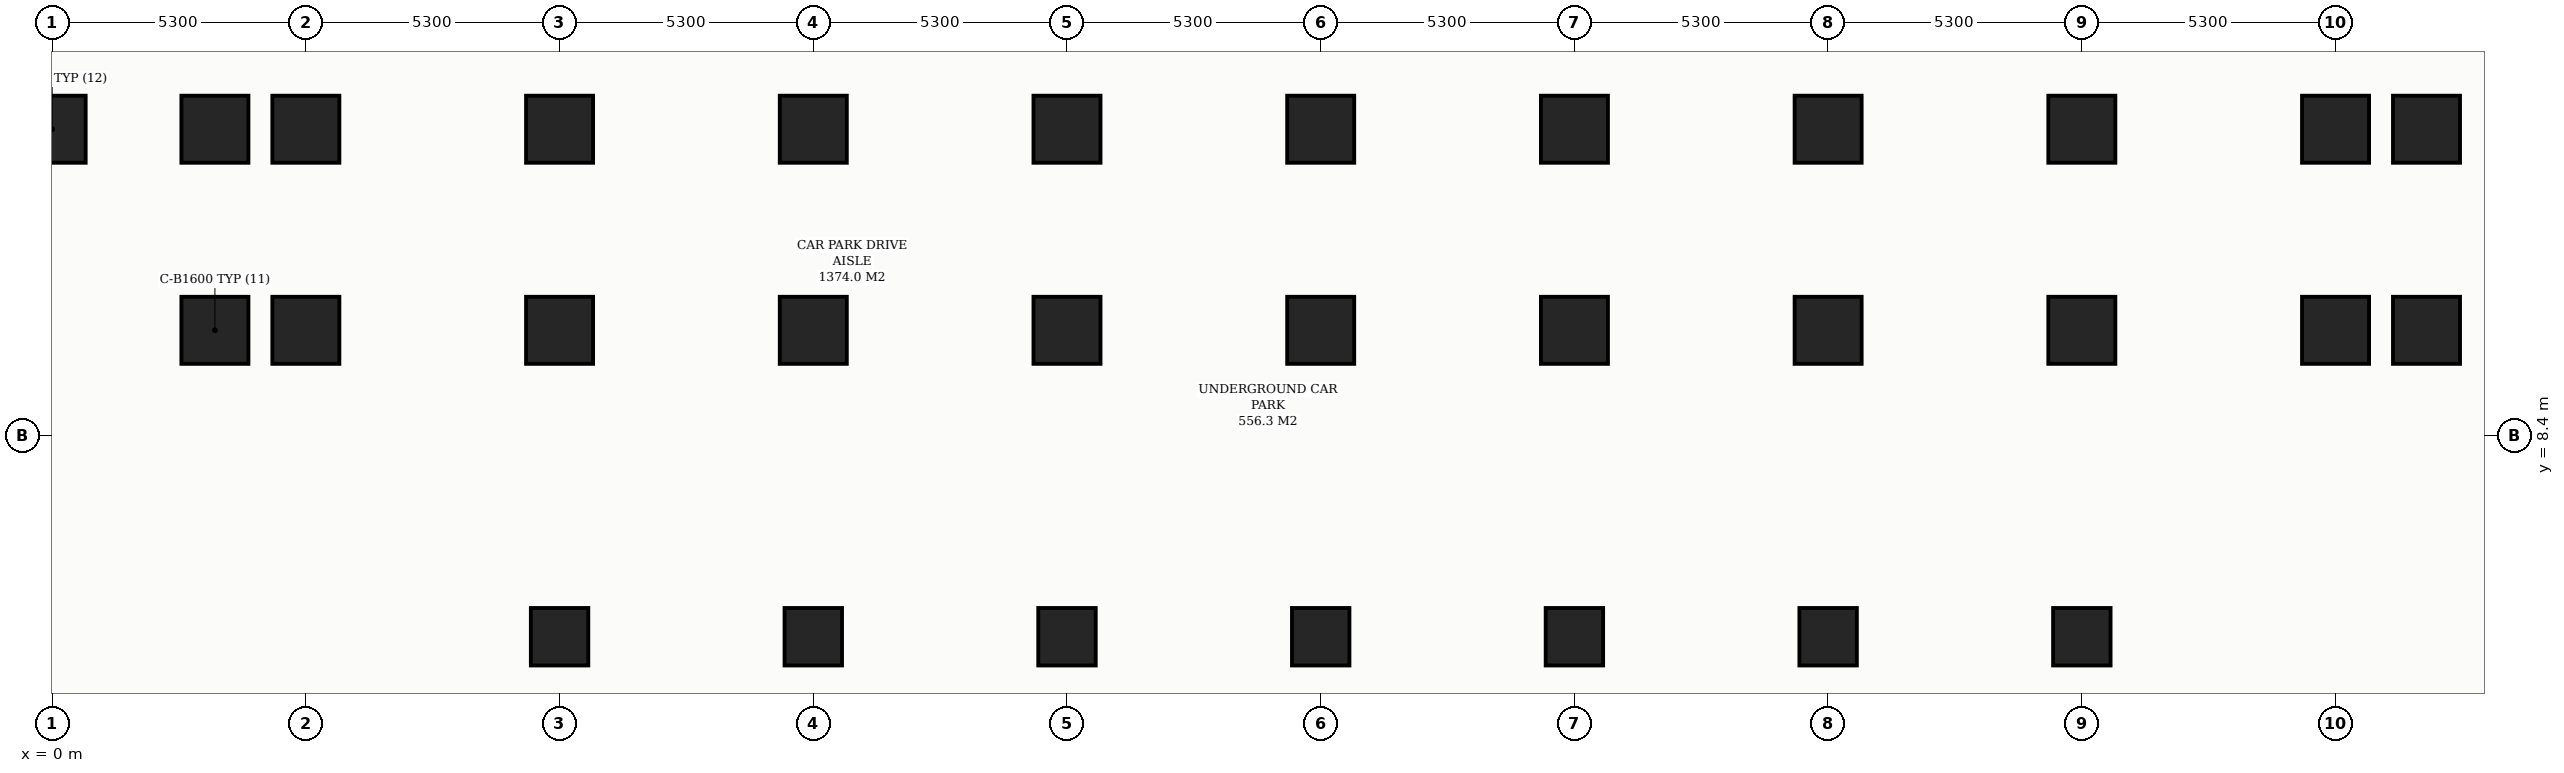
"""IFC4 building model, lengths in metres.
Left out: names, types, materials, properties, quantities, classifications, styles, units other than length and angle.
Written with IfcOpenShell. Run it as: python <this file> out.ifc"""

import sys

from ifc_helpers import new_model, si_unit, direction, frame, origin, origin_2d, place, context, subcontext, project, spatial, hollow_rectangle, extrude, element, save


model = new_model("IFC4")
c1 = context("Model", 3, precision=1e-05, world=origin(), true_north=direction((0.0, 1.0)))
c2 = subcontext(c1, "Body", "Model", "MODEL_VIEW")
j1 = project(units=[si_unit("LENGTHUNIT", "METRE"), si_unit("PLANEANGLEUNIT", "RADIAN")], contexts=[c1])
p1 = place(None, origin())
s1 = spatial("IfcSite", under=j1, at=p1, CompositionType="ELEMENT")
p2 = place(p1, origin())
s2 = spatial("IfcBuilding", under=s1, at=p2, CompositionType="ELEMENT")
p3 = place(p2, frame((0.0, 0.0, -8.4)))
s3 = spatial("IfcBuildingStorey", under=s2, at=p3, CompositionType="ELEMENT", Elevation=-8.4)
p4 = place(p3, frame((10.6, 14.8, 0.0), z_axis=(0.0, 0.0, 1.0), x_axis=(1.0, 0.0, 0.0)))
e1 = element("IfcColumn", 1, at=p4, inside=s3, PredefinedType="COLUMN", context=c2, shape_type="SweptSolid", body=[
    extrude(hollow_rectangle(XDim=1.4, YDim=1.4, WallThickness=0.045, at=origin_2d()), origin(), (0.0, 0.0, 1.0), 4.2),
])
p5 = place(p3, frame((10.6, 4.2, 0.0), z_axis=(0.0, 0.0, 1.0), x_axis=(1.0, 0.0, 0.0)))
e2 = element("IfcColumn", 2, at=p5, inside=s3, PredefinedType="COLUMN", context=c2, shape_type="SweptSolid", body=[
    extrude(hollow_rectangle(XDim=1.2, YDim=1.2, WallThickness=0.04, at=origin_2d()), origin(), (0.0, 0.0, 1.0), 4.2),
])
for number, where, z_axis, x_axis in (
    (3, (10.6, 10.6, 0.0), (0.0, 0.0, 1.0), (1.0, 0.0, 0.0)),
    (4, (15.9, 14.8, 0.0), (0.0, 0.0, 1.0), (1.0, 0.0, 0.0)),
):
    element("IfcColumn", number, at=place(p3, frame(where, z_axis=z_axis, x_axis=x_axis)), inside=s3, PredefinedType="COLUMN", context=c2, shape_type="SweptSolid", body=[
        extrude(hollow_rectangle(XDim=1.4, YDim=1.4, WallThickness=0.045, at=origin_2d()), origin(), (0.0, 0.0, 1.0), 4.2),
    ])
p6 = place(p3, frame((15.9, 4.2, 0.0), z_axis=(0.0, 0.0, 1.0), x_axis=(1.0, 0.0, 0.0)))
e5 = element("IfcColumn", 5, at=p6, inside=s3, PredefinedType="COLUMN", context=c2, shape_type="SweptSolid", body=[
    extrude(hollow_rectangle(XDim=1.2, YDim=1.2, WallThickness=0.04, at=origin_2d()), origin(), (0.0, 0.0, 1.0), 4.2),
])
for number, where, z_axis, x_axis in (
    (6, (15.9, 10.6, 0.0), (0.0, 0.0, 1.0), (1.0, 0.0, 0.0)),
    (7, (21.2, 14.8, 0.0), (0.0, 0.0, 1.0), (1.0, 0.0, 0.0)),
):
    element("IfcColumn", number, at=place(p3, frame(where, z_axis=z_axis, x_axis=x_axis)), inside=s3, PredefinedType="COLUMN", context=c2, shape_type="SweptSolid", body=[
        extrude(hollow_rectangle(XDim=1.4, YDim=1.4, WallThickness=0.045, at=origin_2d()), origin(), (0.0, 0.0, 1.0), 4.2),
    ])
p7 = place(p3, frame((21.2, 4.2, 0.0), z_axis=(0.0, 0.0, 1.0), x_axis=(1.0, 0.0, 0.0)))
e8 = element("IfcColumn", 8, at=p7, inside=s3, PredefinedType="COLUMN", context=c2, shape_type="SweptSolid", body=[
    extrude(hollow_rectangle(XDim=1.2, YDim=1.2, WallThickness=0.04, at=origin_2d()), origin(), (0.0, 0.0, 1.0), 4.2),
])
for number, where, z_axis, x_axis in (
    (9, (21.2, 10.6, 0.0), (0.0, 0.0, 1.0), (1.0, 0.0, 0.0)),
    (10, (26.5, 14.8, 0.0), (0.0, 0.0, 1.0), (1.0, 0.0, 0.0)),
):
    element("IfcColumn", number, at=place(p3, frame(where, z_axis=z_axis, x_axis=x_axis)), inside=s3, PredefinedType="COLUMN", context=c2, shape_type="SweptSolid", body=[
        extrude(hollow_rectangle(XDim=1.4, YDim=1.4, WallThickness=0.045, at=origin_2d()), origin(), (0.0, 0.0, 1.0), 4.2),
    ])
p8 = place(p3, frame((26.5, 4.2, 0.0), z_axis=(0.0, 0.0, 1.0), x_axis=(1.0, 0.0, 0.0)))
e11 = element("IfcColumn", 11, at=p8, inside=s3, PredefinedType="COLUMN", context=c2, shape_type="SweptSolid", body=[
    extrude(hollow_rectangle(XDim=1.2, YDim=1.2, WallThickness=0.04, at=origin_2d()), origin(), (0.0, 0.0, 1.0), 4.2),
])
for number, where, z_axis, x_axis in (
    (12, (26.5, 10.6, 0.0), (0.0, 0.0, 1.0), (1.0, 0.0, 0.0)),
    (13, (31.8, 14.8, 0.0), (0.0, 0.0, 1.0), (1.0, 0.0, 0.0)),
):
    element("IfcColumn", number, at=place(p3, frame(where, z_axis=z_axis, x_axis=x_axis)), inside=s3, PredefinedType="COLUMN", context=c2, shape_type="SweptSolid", body=[
        extrude(hollow_rectangle(XDim=1.4, YDim=1.4, WallThickness=0.045, at=origin_2d()), origin(), (0.0, 0.0, 1.0), 4.2),
    ])
p9 = place(p3, frame((31.8, 4.2, 0.0), z_axis=(0.0, 0.0, 1.0), x_axis=(1.0, 0.0, 0.0)))
e14 = element("IfcColumn", 14, at=p9, inside=s3, PredefinedType="COLUMN", context=c2, shape_type="SweptSolid", body=[
    extrude(hollow_rectangle(XDim=1.2, YDim=1.2, WallThickness=0.04, at=origin_2d()), origin(), (0.0, 0.0, 1.0), 4.2),
])
for number, where, z_axis, x_axis in (
    (15, (31.8, 10.6, 0.0), (0.0, 0.0, 1.0), (1.0, 0.0, 0.0)),
    (16, (37.1, 14.8, 0.0), (0.0, 0.0, 1.0), (1.0, 0.0, 0.0)),
):
    element("IfcColumn", number, at=place(p3, frame(where, z_axis=z_axis, x_axis=x_axis)), inside=s3, PredefinedType="COLUMN", context=c2, shape_type="SweptSolid", body=[
        extrude(hollow_rectangle(XDim=1.4, YDim=1.4, WallThickness=0.045, at=origin_2d()), origin(), (0.0, 0.0, 1.0), 4.2),
    ])
p10 = place(p3, frame((37.1, 4.2, 0.0), z_axis=(0.0, 0.0, 1.0), x_axis=(1.0, 0.0, 0.0)))
e17 = element("IfcColumn", 17, at=p10, inside=s3, PredefinedType="COLUMN", context=c2, shape_type="SweptSolid", body=[
    extrude(hollow_rectangle(XDim=1.2, YDim=1.2, WallThickness=0.04, at=origin_2d()), origin(), (0.0, 0.0, 1.0), 4.2),
])
for number, where, z_axis, x_axis in (
    (18, (37.1, 10.6, 0.0), (0.0, 0.0, 1.0), (1.0, 0.0, 0.0)),
    (19, (42.4, 14.8, 0.0), (0.0, 0.0, 1.0), (1.0, 0.0, 0.0)),
):
    element("IfcColumn", number, at=place(p3, frame(where, z_axis=z_axis, x_axis=x_axis)), inside=s3, PredefinedType="COLUMN", context=c2, shape_type="SweptSolid", body=[
        extrude(hollow_rectangle(XDim=1.4, YDim=1.4, WallThickness=0.045, at=origin_2d()), origin(), (0.0, 0.0, 1.0), 4.2),
    ])
p11 = place(p3, frame((42.4, 4.2, 0.0), z_axis=(0.0, 0.0, 1.0), x_axis=(1.0, 0.0, 0.0)))
e20 = element("IfcColumn", 20, at=p11, inside=s3, PredefinedType="COLUMN", context=c2, shape_type="SweptSolid", body=[
    extrude(hollow_rectangle(XDim=1.2, YDim=1.2, WallThickness=0.04, at=origin_2d()), origin(), (0.0, 0.0, 1.0), 4.2),
])
for number, where, z_axis, x_axis in (
    (21, (42.4, 10.6, 0.0), (0.0, 0.0, 1.0), (1.0, 0.0, 0.0)),
    (22, (3.4, 10.6, 0.0), (0.0, 0.0, 1.0), (1.0, 0.0, 0.0)),
    (23, (3.4, 14.8, 0.0), (0.0, 0.0, 1.0), (1.0, 0.0, 0.0)),
    (24, (5.3, 10.6, 0.0), (0.0, 0.0, 1.0), (1.0, 0.0, 0.0)),
    (25, (5.3, 14.8, 0.0), (0.0, 0.0, 1.0), (1.0, 0.0, 0.0)),
    (26, (47.7, 10.6, 0.0), (0.0, 0.0, 1.0), (1.0, 0.0, 0.0)),
    (27, (47.7, 14.8, 0.0), (0.0, 0.0, 1.0), (1.0, 0.0, 0.0)),
    (28, (49.6, 10.6, 0.0), (0.0, 0.0, 1.0), (1.0, 0.0, 0.0)),
    (29, (49.6, 14.8, 0.0), (0.0, 0.0, 1.0), (1.0, 0.0, 0.0)),
    (30, (0.0, 14.8, 0.0), (0.0, 0.0, 1.0), (1.0, 0.0, 0.0)),
):
    element("IfcColumn", number, at=place(p3, frame(where, z_axis=z_axis, x_axis=x_axis)), inside=s3, PredefinedType="COLUMN", context=c2, shape_type="SweptSolid", body=[
        extrude(hollow_rectangle(XDim=1.4, YDim=1.4, WallThickness=0.045, at=origin_2d()), origin(), (0.0, 0.0, 1.0), 4.2),
    ])
save(model, sys.argv[1])
